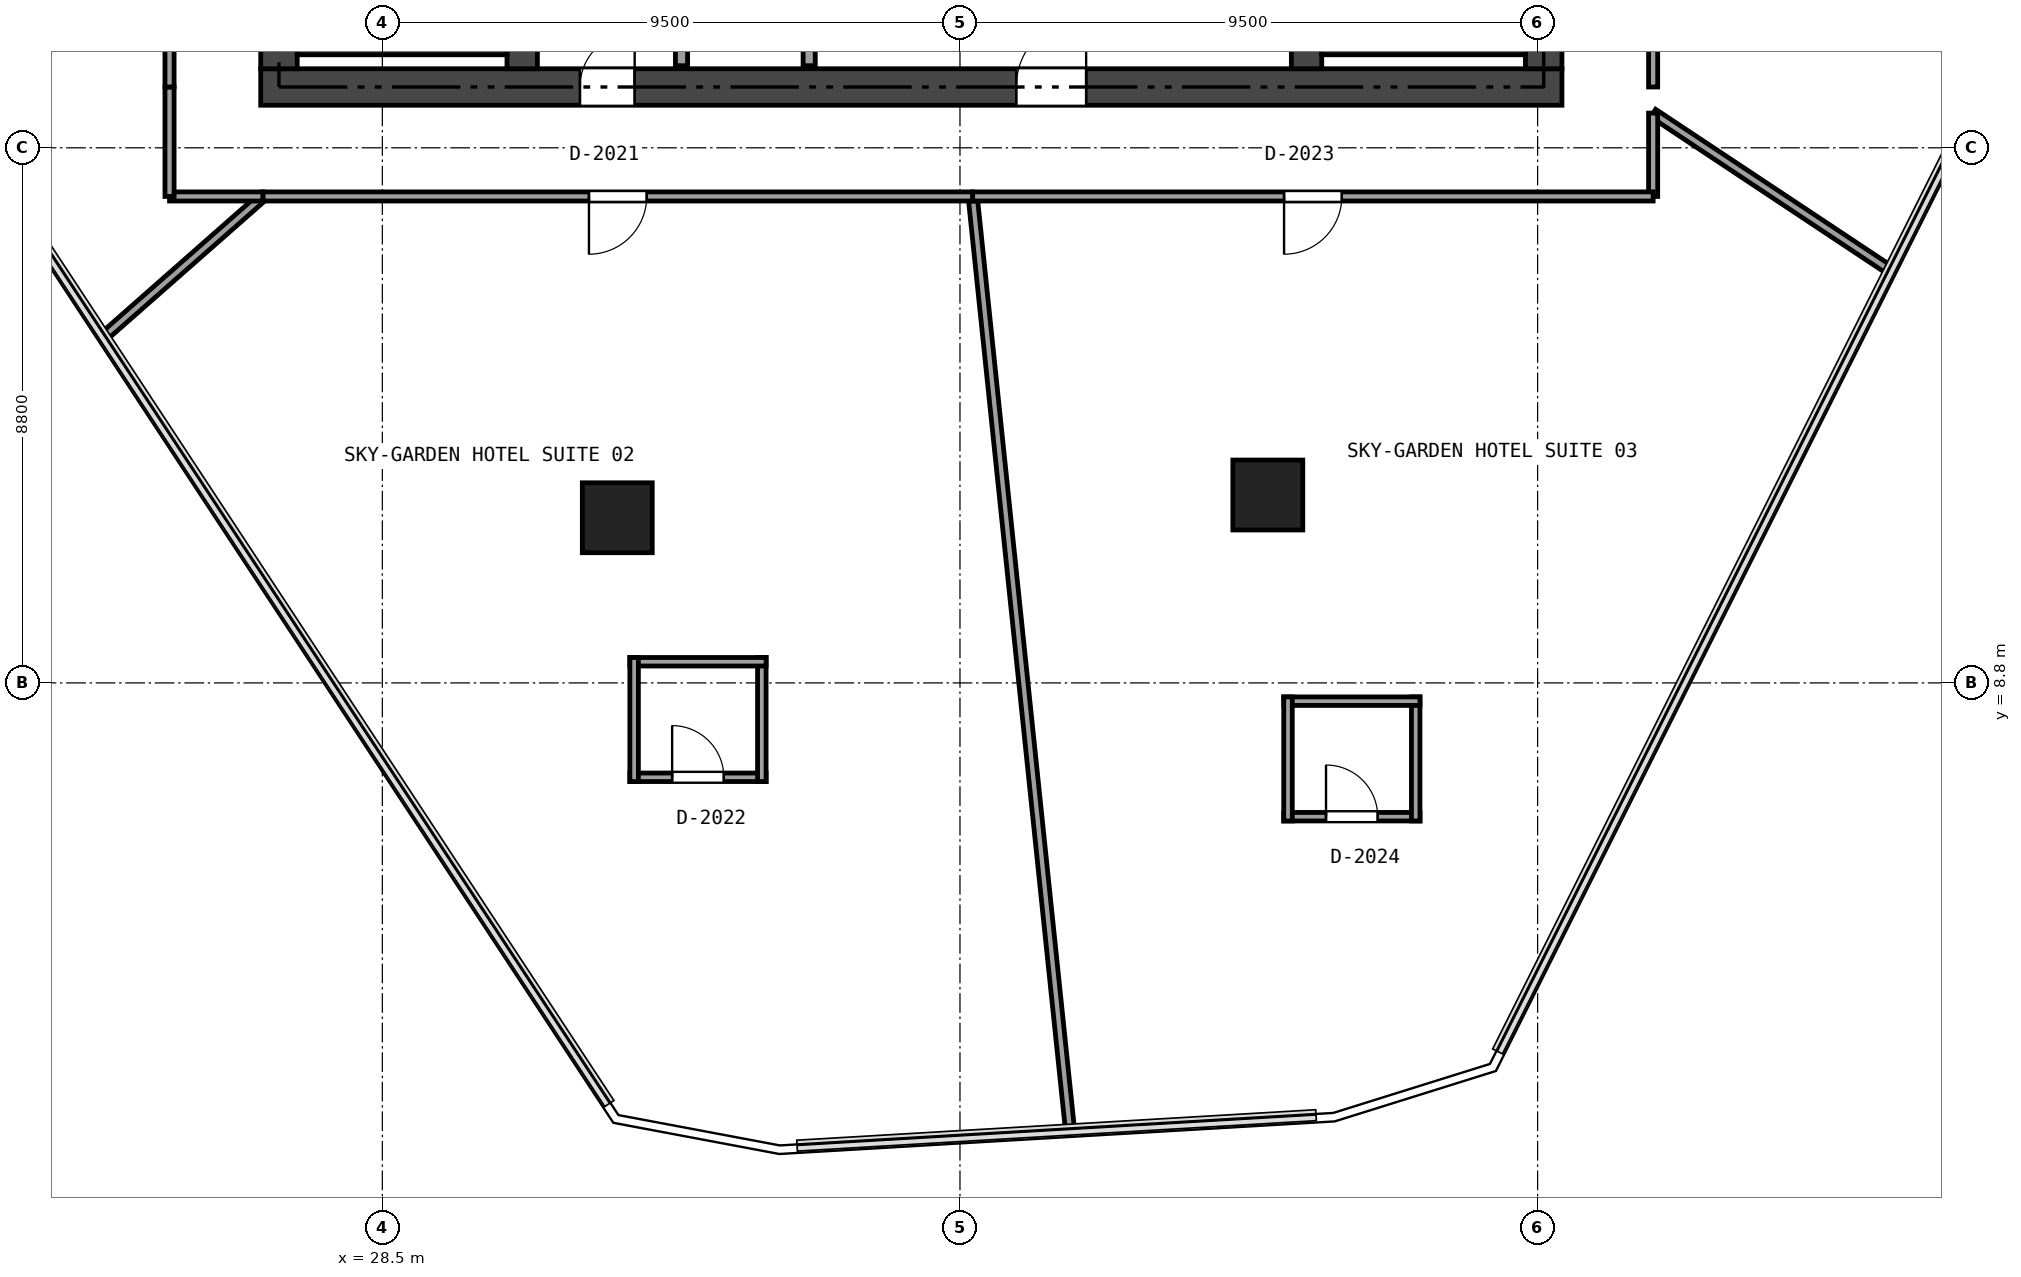
"""IFC4 building model, lengths in metres.
Left out: names, types, materials, properties, quantities, classifications, styles, units other than length and angle.
Written with IfcOpenShell. Run it as: python <this file> out.ifc"""

import sys

from ifc_helpers import new_model, si_unit, direction, frame, frame_2d, origin, origin_2d, place, context, subcontext, project, spatial, rectangle, extrude, element, fill, save


model = new_model("IFC4")
c1 = context("Model", 3, precision=1e-05, world=origin(), true_north=direction((0.0, 1.0)))
c2 = subcontext(c1, "Body", "Model", "MODEL_VIEW")
j1 = project(units=[si_unit("LENGTHUNIT", "METRE"), si_unit("PLANEANGLEUNIT", "RADIAN")], contexts=[c1])
p1 = place(None, origin())
s1 = spatial("IfcSite", under=j1, at=p1, CompositionType="ELEMENT")
p2 = place(p1, origin())
s2 = spatial("IfcBuilding", under=s1, at=p2, CompositionType="ELEMENT")
p3 = place(p2, frame((0.0, 0.0, 79.8)))
s3 = spatial("IfcBuildingStorey", under=s2, at=p3, CompositionType="ELEMENT", Elevation=79.8)
p4 = place(p3, frame((26.5, 18.6, 0.0), z_axis=(0.0, 0.0, 1.0), x_axis=(1.0, 0.0, 0.0)))
e1 = element("IfcWall", 1, at=p4, inside=s3, PredefinedType="SHEAR", context=c2, shape_type="SweptSolid", body=[
    extrude(rectangle(XDim=21.4, YDim=0.6, at=frame_2d((10.7, 0.0))), origin(), (0.0, 0.0, 1.0), 3.17),
])
p5 = place(p4, frame((12.425, 0.0, 0.0)))
e2 = element("IfcOpeningElement", 2, at=p5, cuts=e1, PredefinedType="OPENING", context=c2, shape_type="SweptSolid", body=[
    extrude(rectangle(XDim=1.15, YDim=2.15, at=frame_2d((0.575, 1.075))), frame((0.0, 0.31, 0.0), z_axis=(0.0, -1.0, 0.0), x_axis=(1.0, 0.0, 0.0)), (0.0, 0.0, 1.0), 0.62),
])
p6 = place(p4, frame((5.25, 0.0, 0.0)))
e3 = element("IfcOpeningElement", 3, at=p6, cuts=e1, PredefinedType="OPENING", context=c2, shape_type="SweptSolid", body=[
    extrude(rectangle(XDim=0.9, YDim=2.1, at=frame_2d((0.45, 1.05))), frame((0.0, 0.31, 0.0), z_axis=(0.0, -1.0, 0.0), x_axis=(1.0, 0.0, 0.0)), (0.0, 0.0, 1.0), 0.62),
])
p7 = place(p3, frame((26.8, 18.9, 0.0), z_axis=(0.0, 0.0, 1.0), x_axis=(0.0, 1.0, 0.0)))
e4 = element("IfcWall", 4, at=p7, inside=s3, PredefinedType="SHEAR", context=c2, shape_type="SweptSolid", body=[
    extrude(rectangle(XDim=15.0, YDim=0.6, at=frame_2d((7.5, 0.0))), origin(), (0.0, 0.0, 1.0), 3.17),
])
p8 = place(p3, frame((47.6, 18.9, 0.0), z_axis=(0.0, 0.0, 1.0), x_axis=(0.0, 1.0, 0.0)))
e5 = element("IfcWall", 5, at=p8, inside=s3, PredefinedType="SHEAR", context=c2, shape_type="SweptSolid", body=[
    extrude(rectangle(XDim=15.0, YDim=0.6, at=frame_2d((7.5, 0.0))), origin(), (0.0, 0.0, 1.0), 3.17),
])
p9 = place(p8, frame((6.6, 0.0, 0.0)))
e6 = element("IfcOpeningElement", 6, at=p9, cuts=e5, PredefinedType="OPENING", context=c2, shape_type="SweptSolid", body=[
    extrude(rectangle(XDim=1.1, YDim=2.15, at=frame_2d((0.55, 1.075))), frame((0.0, 0.31, 0.0), z_axis=(0.0, -1.0, 0.0), x_axis=(1.0, 0.0, 0.0)), (0.0, 0.0, 1.0), 0.62),
])
p10 = place(p8, frame((8.5, 0.0, 0.0)))
e7 = element("IfcOpeningElement", 7, at=p10, cuts=e5, PredefinedType="OPENING", context=c2, shape_type="SweptSolid", body=[
    extrude(rectangle(XDim=0.9, YDim=2.1, at=frame_2d((0.45, 1.05))), frame((0.0, 0.31, 0.0), z_axis=(0.0, -1.0, 0.0), x_axis=(1.0, 0.0, 0.0)), (0.0, 0.0, 1.0), 0.62),
])
p11 = place(p8, frame((13.15, 0.0, 0.0)))
e8 = element("IfcOpeningElement", 8, at=p11, cuts=e5, PredefinedType="OPENING", context=c2, shape_type="SweptSolid", body=[
    extrude(rectangle(XDim=0.9, YDim=2.1, at=frame_2d((0.45, 1.05))), frame((0.0, 0.31, 0.0), z_axis=(0.0, -1.0, 0.0), x_axis=(1.0, 0.0, 0.0)), (0.0, 0.0, 1.0), 0.62),
])
p12 = place(p3, frame((30.8, 18.9, 0.0), z_axis=(0.0, 0.0, 1.0), x_axis=(0.0, 1.0, 0.0)))
e9 = element("IfcWall", 9, at=p12, inside=s3, PredefinedType="SHEAR", context=c2, shape_type="SweptSolid", body=[
    extrude(rectangle(XDim=15.0, YDim=0.5, at=frame_2d((7.5, 0.0))), origin(), (0.0, 0.0, 1.0), 3.17),
])
p13 = place(p12, frame((6.6, 0.0, 0.0)))
e10 = element("IfcOpeningElement", 10, at=p13, cuts=e9, PredefinedType="OPENING", context=c2, shape_type="SweptSolid", body=[
    extrude(rectangle(XDim=1.1, YDim=2.15, at=frame_2d((0.55, 1.075))), frame((0.0, 0.26, 0.0), z_axis=(0.0, -1.0, 0.0), x_axis=(1.0, 0.0, 0.0)), (0.0, 0.0, 1.0), 0.52),
])
p14 = place(p12, frame((8.4, 0.0, 0.0)))
e11 = element("IfcOpeningElement", 11, at=p14, cuts=e9, PredefinedType="OPENING", context=c2, shape_type="SweptSolid", body=[
    extrude(rectangle(XDim=0.9, YDim=2.1, at=frame_2d((0.45, 1.05))), frame((0.0, 0.26, 0.0), z_axis=(0.0, -1.0, 0.0), x_axis=(1.0, 0.0, 0.0)), (0.0, 0.0, 1.0), 0.52),
])
p15 = place(p3, frame((43.7, 18.9, 0.0), z_axis=(0.0, 0.0, 1.0), x_axis=(0.0, 1.0, 0.0)))
e12 = element("IfcWall", 12, at=p15, inside=s3, PredefinedType="SHEAR", context=c2, shape_type="SweptSolid", body=[
    extrude(rectangle(XDim=15.0, YDim=0.5, at=frame_2d((7.5, 0.0))), origin(), (0.0, 0.0, 1.0), 3.17),
])
p16 = place(p15, frame((8.1, 0.0, 0.0)))
e13 = element("IfcOpeningElement", 13, at=p16, cuts=e12, PredefinedType="OPENING", context=c2, shape_type="SweptSolid", body=[
    extrude(rectangle(XDim=0.9, YDim=2.1, at=frame_2d((0.45, 1.05))), frame((0.0, 0.26, 0.0), z_axis=(0.0, -1.0, 0.0), x_axis=(1.0, 0.0, 0.0)), (0.0, 0.0, 1.0), 0.52),
])
p17 = place(p3, frame((27.1, 19.24, 0.0), z_axis=(0.0, 0.0, 1.0), x_axis=(1.0, 0.0, 0.0)))
e14 = element("IfcWall", 14, at=p17, inside=s3, PredefinedType="SHEAR", context=c2, shape_type="SweptSolid", body=[
    extrude(rectangle(XDim=3.45, YDim=0.22, at=frame_2d((1.725, 0.0))), origin(), (0.0, 0.0, 1.0), 3.17),
])
p18 = place(p3, frame((43.95, 19.24, 0.0), z_axis=(0.0, 0.0, 1.0), x_axis=(1.0, 0.0, 0.0)))
e15 = element("IfcWall", 15, at=p18, inside=s3, PredefinedType="SHEAR", context=c2, shape_type="SweptSolid", body=[
    extrude(rectangle(XDim=3.35, YDim=0.22, at=frame_2d((1.675, 0.0))), origin(), (0.0, 0.0, 1.0), 3.17),
])
for number, where, z_axis, x_axis in (
    (16, (32.364, 11.516, 0.0), (0.0, 0.0, 1.0), (1.0, 0.0, 0.0)),
    (17, (43.063, 11.89, 0.0), (0.0, 0.0, 1.0), (1.0, 0.0, 0.0)),
):
    element("IfcColumn", number, at=place(p3, frame(where, z_axis=z_axis, x_axis=x_axis)), inside=s3, PredefinedType="COLUMN", context=c2, shape_type="SweptSolid", body=[
        extrude(rectangle(XDim=1.15, YDim=1.15, at=origin_2d()), origin(), (0.0, 0.0, 1.0), 3.17),
    ])
p19 = place(p3, frame((35.52, 18.95, 0.0), z_axis=(0.0, 0.0, 1.0), x_axis=(0.0, 1.0, 0.0)))
e18 = element("IfcWall", 18, at=p19, inside=s3, PredefinedType="SOLIDWALL", context=c2, shape_type="SweptSolid", body=[
    extrude(rectangle(XDim=14.9, YDim=0.2, at=frame_2d((7.45, 0.0))), origin(), (0.0, 0.0, 1.0), 2.691),
])
p20 = place(p19, frame((7.755, 0.0, 0.0)))
e19 = element("IfcOpeningElement", 19, at=p20, cuts=e18, PredefinedType="OPENING", context=c2, shape_type="SweptSolid", body=[
    extrude(rectangle(XDim=0.95, YDim=2.15, at=frame_2d((0.475, 1.075))), frame((0.0, 0.11, 0.0), z_axis=(0.0, -1.0, 0.0), x_axis=(1.0, 0.0, 0.0)), (0.0, 0.0, 1.0), 0.22),
])
p21 = place(p19, frame((0.6, 0.0, 0.0)))
e20 = element("IfcOpeningElement", 20, at=p21, cuts=e18, PredefinedType="OPENING", context=c2, shape_type="SweptSolid", body=[
    extrude(rectangle(XDim=0.9, YDim=2.1, at=frame_2d((0.45, 1.05))), frame((0.0, 0.11, 0.0), z_axis=(0.0, -1.0, 0.0), x_axis=(1.0, 0.0, 0.0)), (0.0, 0.0, 1.0), 0.22),
])
p22 = place(p3, frame((33.42, 18.95, 0.0), z_axis=(0.0, 0.0, 1.0), x_axis=(0.0, 1.0, 0.0)))
e21 = element("IfcWall", 21, at=p22, inside=s3, PredefinedType="SOLIDWALL", context=c2, shape_type="SweptSolid", body=[
    extrude(rectangle(XDim=6.13, YDim=0.2, at=frame_2d((3.065, 0.0))), origin(), (0.0, 0.0, 1.0), 2.691),
])
p23 = place(p3, frame((32.571, 7.248, 0.0), z_axis=(0.0, 0.0, 1.0), x_axis=(1.0, 0.0, 0.0)))
e22 = element("IfcWall", 22, at=p23, inside=s3, PredefinedType="PARTITIONING", context=c2, shape_type="SweptSolid", body=[
    extrude(rectangle(XDim=2.24, YDim=0.14, at=frame_2d((1.12, 0.0))), origin(), (0.0, 0.0, 1.0), 3.17),
])
p24 = place(p23, frame((0.695, 0.0, 0.0)))
e23 = element("IfcOpeningElement", 23, at=p24, cuts=e22, PredefinedType="OPENING", context=c2, shape_type="SweptSolid", body=[
    extrude(rectangle(XDim=0.85, YDim=2.1, at=frame_2d((0.425, 1.05))), frame((0.0, 0.08, 0.0), z_axis=(0.0, -1.0, 0.0), x_axis=(1.0, 0.0, 0.0)), (0.0, 0.0, 1.0), 0.16),
])
p25 = place(p3, frame((34.741, 7.178, 0.0), z_axis=(0.0, 0.0, 1.0), x_axis=(0.0, 1.0, 0.0)))
e24 = element("IfcWall", 24, at=p25, inside=s3, PredefinedType="PARTITIONING", context=c2, shape_type="SweptSolid", body=[
    extrude(rectangle(XDim=2.04, YDim=0.14, at=frame_2d((1.02, 0.0))), origin(), (0.0, 0.0, 1.0), 3.17),
])
p26 = place(p3, frame((34.811, 9.148, 0.0), z_axis=(0.0, 0.0, 1.0), x_axis=(-1.0, 0.0, 0.0)))
e25 = element("IfcWall", 25, at=p26, inside=s3, PredefinedType="PARTITIONING", context=c2, shape_type="SweptSolid", body=[
    extrude(rectangle(XDim=2.24, YDim=0.14, at=frame_2d((1.12, 0.0))), origin(), (0.0, 0.0, 1.0), 3.17),
])
p27 = place(p3, frame((32.641, 9.218, 0.0), z_axis=(0.0, 0.0, 1.0), x_axis=(0.0, -1.0, 0.0)))
e26 = element("IfcWall", 26, at=p27, inside=s3, PredefinedType="PARTITIONING", context=c2, shape_type="SweptSolid", body=[
    extrude(rectangle(XDim=2.04, YDim=0.14, at=frame_2d((1.02, 0.0))), origin(), (0.0, 0.0, 1.0), 3.17),
])
p28 = place(p3, frame((43.325, 6.6, 0.0), z_axis=(0.0, 0.0, 1.0), x_axis=(1.0, 0.0, 0.0)))
e27 = element("IfcWall", 27, at=p28, inside=s3, PredefinedType="PARTITIONING", context=c2, shape_type="SweptSolid", body=[
    extrude(rectangle(XDim=2.24, YDim=0.14, at=frame_2d((1.12, 0.0))), origin(), (0.0, 0.0, 1.0), 3.17),
])
p29 = place(p28, frame((0.695, 0.0, 0.0)))
e28 = element("IfcOpeningElement", 28, at=p29, cuts=e27, PredefinedType="OPENING", context=c2, shape_type="SweptSolid", body=[
    extrude(rectangle(XDim=0.85, YDim=2.1, at=frame_2d((0.425, 1.05))), frame((0.0, 0.08, 0.0), z_axis=(0.0, -1.0, 0.0), x_axis=(1.0, 0.0, 0.0)), (0.0, 0.0, 1.0), 0.16),
])
p30 = place(p3, frame((45.495, 6.53, 0.0), z_axis=(0.0, 0.0, 1.0), x_axis=(0.0, 1.0, 0.0)))
e29 = element("IfcWall", 29, at=p30, inside=s3, PredefinedType="PARTITIONING", context=c2, shape_type="SweptSolid", body=[
    extrude(rectangle(XDim=2.04, YDim=0.14, at=frame_2d((1.02, 0.0))), origin(), (0.0, 0.0, 1.0), 3.17),
])
p31 = place(p3, frame((45.565, 8.5, 0.0), z_axis=(0.0, 0.0, 1.0), x_axis=(-1.0, 0.0, 0.0)))
e30 = element("IfcWall", 30, at=p31, inside=s3, PredefinedType="PARTITIONING", context=c2, shape_type="SweptSolid", body=[
    extrude(rectangle(XDim=2.24, YDim=0.14, at=frame_2d((1.12, 0.0))), origin(), (0.0, 0.0, 1.0), 3.17),
])
p32 = place(p3, frame((43.395, 8.57, 0.0), z_axis=(0.0, 0.0, 1.0), x_axis=(0.0, -1.0, 0.0)))
e31 = element("IfcWall", 31, at=p32, inside=s3, PredefinedType="PARTITIONING", context=c2, shape_type="SweptSolid", body=[
    extrude(rectangle(XDim=2.04, YDim=0.14, at=frame_2d((1.02, 0.0))), origin(), (0.0, 0.0, 1.0), 3.17),
])
p33 = place(p3, frame((23.895, 14.475, 0.0), z_axis=(0.0, 0.0, 1.0), x_axis=(0.750846960114, 0.660476224013, 0.0)))
e32 = element("IfcWall", 32, at=p33, inside=s3, PredefinedType="PARTITIONING", context=c2, shape_type="SweptSolid", body=[
    extrude(rectangle(XDim=3.52, YDim=0.15, at=frame_2d((1.76, 0.0))), origin(), (0.0, 0.0, 1.0), 2.455),
])
p34 = place(p3, frame((26.538, 16.8, 0.0), z_axis=(0.0, 0.0, 1.0), x_axis=(-1.0, 0.0, 0.0)))
e33 = element("IfcWall", 33, at=p34, inside=s3, PredefinedType="PARTITIONING", context=c2, shape_type="SweptSolid", body=[
    extrude(rectangle(XDim=1.538, YDim=0.15, at=frame_2d((0.769, 0.0))), origin(), (0.0, 0.0, 1.0), 2.455),
])
p35 = place(p3, frame((25.0, 16.8, 0.0), z_axis=(0.0, 0.0, 1.0), x_axis=(0.0, 1.0, 0.0)))
e34 = element("IfcWall", 34, at=p35, inside=s3, PredefinedType="PARTITIONING", context=c2, shape_type="SweptSolid", body=[
    extrude(rectangle(XDim=1.8, YDim=0.15, at=frame_2d((0.9, 0.0))), origin(), (0.0, 0.0, 1.0), 2.455),
])
p36 = place(p3, frame((25.0, 18.6, 0.0), z_axis=(0.0, 0.0, 1.0), x_axis=(0.0, 1.0, 0.0)))
e35 = element("IfcWall", 35, at=p36, inside=s3, PredefinedType="PARTITIONING", context=c2, shape_type="SweptSolid", body=[
    extrude(rectangle(XDim=10.393, YDim=0.15, at=frame_2d((5.196, 0.0))), origin(), (0.0, 0.0, 1.0), 2.467),
])
p37 = place(p36, frame((4.721, 0.0, 0.0)))
e36 = element("IfcOpeningElement", 36, at=p37, cuts=e35, PredefinedType="OPENING", context=c2, shape_type="SweptSolid", body=[
    extrude(rectangle(XDim=0.95, YDim=2.15, at=frame_2d((0.475, 1.075))), frame((0.0, 0.085, 0.0), z_axis=(0.0, -1.0, 0.0), x_axis=(1.0, 0.0, 0.0)), (0.0, 0.0, 1.0), 0.17),
])
p38 = place(p3, frame((39.813, 1.414, 0.0), z_axis=(0.0, 0.0, 1.0), x_axis=(-0.103689026826, 0.994609765544, 0.0)))
e37 = element("IfcWall", 37, at=p38, inside=s3, PredefinedType="PARTITIONING", context=c2, shape_type="SweptSolid", body=[
    extrude(rectangle(XDim=15.469, YDim=0.15, at=frame_2d((7.735, 0.0))), origin(), (0.0, 0.0, 1.0), 2.455),
])
p39 = place(p3, frame((38.209, 16.8, 0.0), z_axis=(0.0, 0.0, 1.0), x_axis=(-1.0, 0.0, 0.0)))
e38 = element("IfcWall", 38, at=p39, inside=s3, PredefinedType="PARTITIONING", context=c2, shape_type="SweptSolid", body=[
    extrude(rectangle(XDim=11.671, YDim=0.15, at=frame_2d((5.835, 0.0))), origin(), (0.0, 0.0, 1.0), 2.455),
])
p40 = place(p39, frame((5.361, 0.0, 0.0)))
e39 = element("IfcOpeningElement", 39, at=p40, cuts=e38, PredefinedType="OPENING", context=c2, shape_type="SweptSolid", body=[
    extrude(rectangle(XDim=0.95, YDim=2.15, at=frame_2d((0.475, 1.075))), frame((0.0, 0.085, 0.0), z_axis=(0.0, -1.0, 0.0), x_axis=(1.0, 0.0, 0.0)), (0.0, 0.0, 1.0), 0.17),
])
p41 = place(p3, frame((53.322, 15.568, 0.0), z_axis=(0.0, 0.0, 1.0), x_axis=(-0.833221395331, 0.5529395142, 0.0)))
e40 = element("IfcWall", 40, at=p41, inside=s3, PredefinedType="PARTITIONING", context=c2, shape_type="SweptSolid", body=[
    extrude(rectangle(XDim=4.707, YDim=0.15, at=frame_2d((2.354, 0.0))), origin(), (0.0, 0.0, 1.0), 3.17),
])
p42 = place(p3, frame((49.4, 18.171, 0.0), z_axis=(0.0, 0.0, 1.0), x_axis=(0.0, -1.0, 0.0)))
e41 = element("IfcWall", 41, at=p42, inside=s3, PredefinedType="PARTITIONING", context=c2, shape_type="SweptSolid", body=[
    extrude(rectangle(XDim=1.371, YDim=0.15, at=frame_2d((0.686, 0.0))), origin(), (0.0, 0.0, 1.0), 3.17),
])
p43 = place(p3, frame((49.4, 16.8, 0.0), z_axis=(0.0, 0.0, 1.0), x_axis=(-1.0, 0.0, 0.0)))
e42 = element("IfcWall", 42, at=p43, inside=s3, PredefinedType="PARTITIONING", context=c2, shape_type="SweptSolid", body=[
    extrude(rectangle(XDim=11.191, YDim=0.15, at=frame_2d((5.595, 0.0))), origin(), (0.0, 0.0, 1.0), 2.455),
])
p44 = place(p43, frame((5.12, 0.0, 0.0)))
e43 = element("IfcOpeningElement", 43, at=p44, cuts=e42, PredefinedType="OPENING", context=c2, shape_type="SweptSolid", body=[
    extrude(rectangle(XDim=0.95, YDim=2.15, at=frame_2d((0.475, 1.075))), frame((0.0, 0.085, 0.0), z_axis=(0.0, -1.0, 0.0), x_axis=(1.0, 0.0, 0.0)), (0.0, 0.0, 1.0), 0.17),
])
p45 = place(p3, frame((49.4, 29.669, 0.0), z_axis=(0.0, 0.0, 1.0), x_axis=(0.0, -1.0, 0.0)))
e44 = element("IfcWall", 44, at=p45, inside=s3, PredefinedType="PARTITIONING", context=c2, shape_type="SweptSolid", body=[
    extrude(rectangle(XDim=11.069, YDim=0.15, at=frame_2d((5.534, 0.0))), origin(), (0.0, 0.0, 1.0), 2.455),
])
p46 = place(p45, frame((5.06, 0.0, 0.0)))
e45 = element("IfcOpeningElement", 45, at=p46, cuts=e44, PredefinedType="OPENING", context=c2, shape_type="SweptSolid", body=[
    extrude(rectangle(XDim=0.95, YDim=2.15, at=frame_2d((0.475, 1.075))), frame((0.0, 0.085, 0.0), z_axis=(0.0, -1.0, 0.0), x_axis=(1.0, 0.0, 0.0)), (0.0, 0.0, 1.0), 0.17),
])
p47 = place(p5, origin())
e46 = element("IfcDoor", 46, at=p47, inside=s3, OperationType="SINGLE_SWING_RIGHT", PredefinedType="DOOR", context=c2, shape_type="SweptSolid", body=[
    extrude(rectangle(XDim=1.15, YDim=2.15, at=frame_2d((0.575, 1.075))), frame((0.0, 0.025, 0.0), z_axis=(0.0, -1.0, 0.0), x_axis=(1.0, 0.0, 0.0)), (0.0, 0.0, 1.0), 0.05),
])
fill(e2, e46)
p48 = place(p6, origin())
e47 = element("IfcDoor", 47, at=p48, inside=s3, OperationType="SINGLE_SWING_RIGHT", PredefinedType="DOOR", context=c2, shape_type="SweptSolid", body=[
    extrude(rectangle(XDim=0.9, YDim=2.1, at=frame_2d((0.45, 1.05))), frame((0.0, 0.025, 0.0), z_axis=(0.0, -1.0, 0.0), x_axis=(1.0, 0.0, 0.0)), (0.0, 0.0, 1.0), 0.05),
])
fill(e3, e47)
p49 = place(p40, origin())
e48 = element("IfcDoor", 48, at=p49, inside=s3, OperationType="SINGLE_SWING_RIGHT", PredefinedType="DOOR", context=c2, shape_type="SweptSolid", body=[
    extrude(rectangle(XDim=0.95, YDim=2.15, at=frame_2d((0.475, 1.075))), frame((0.0, 0.025, 0.0), z_axis=(0.0, -1.0, 0.0), x_axis=(1.0, 0.0, 0.0)), (0.0, 0.0, 1.0), 0.05),
])
fill(e39, e48)
p50 = place(p24, origin())
e49 = element("IfcDoor", 49, at=p50, inside=s3, OperationType="SINGLE_SWING_LEFT", PredefinedType="DOOR", context=c2, shape_type="SweptSolid", body=[
    extrude(rectangle(XDim=0.85, YDim=2.1, at=frame_2d((0.425, 1.05))), frame((0.0, 0.025, 0.0), z_axis=(0.0, -1.0, 0.0), x_axis=(1.0, 0.0, 0.0)), (0.0, 0.0, 1.0), 0.05),
])
fill(e23, e49)
p51 = place(p44, origin())
e50 = element("IfcDoor", 50, at=p51, inside=s3, OperationType="SINGLE_SWING_RIGHT", PredefinedType="DOOR", context=c2, shape_type="SweptSolid", body=[
    extrude(rectangle(XDim=0.95, YDim=2.15, at=frame_2d((0.475, 1.075))), frame((0.0, 0.025, 0.0), z_axis=(0.0, -1.0, 0.0), x_axis=(1.0, 0.0, 0.0)), (0.0, 0.0, 1.0), 0.05),
])
fill(e43, e50)
p52 = place(p29, origin())
e51 = element("IfcDoor", 51, at=p52, inside=s3, OperationType="SINGLE_SWING_LEFT", PredefinedType="DOOR", context=c2, shape_type="SweptSolid", body=[
    extrude(rectangle(XDim=0.85, YDim=2.1, at=frame_2d((0.425, 1.05))), frame((0.0, 0.025, 0.0), z_axis=(0.0, -1.0, 0.0), x_axis=(1.0, 0.0, 0.0)), (0.0, 0.0, 1.0), 0.05),
])
fill(e28, e51)
save(model, sys.argv[1])
